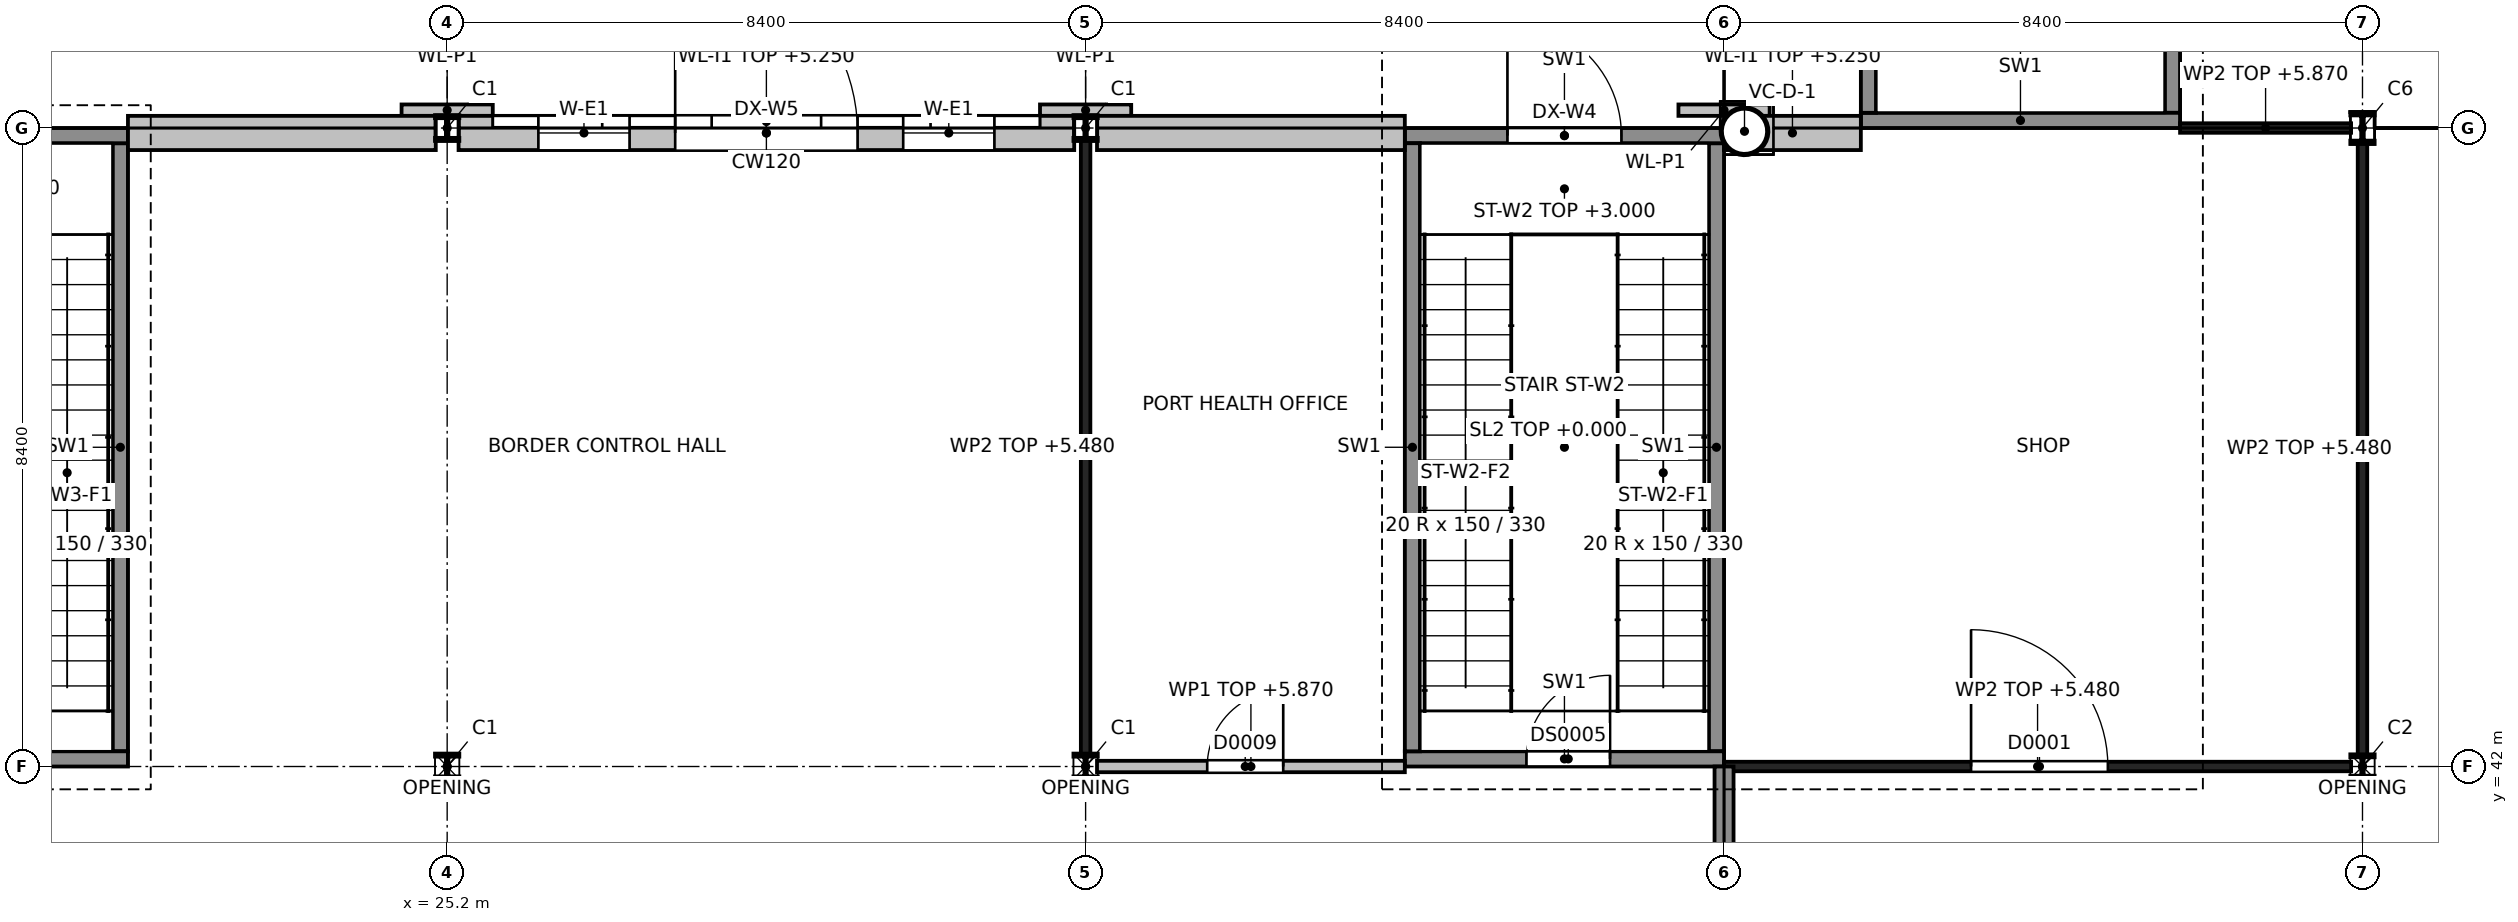
"""IFC4 building model, lengths in metres.
Left out: names, types, materials, properties, quantities, classifications, styles, units other than length and angle.
Written with IfcOpenShell. Run it as: python <this file> out.ifc"""

import sys

from ifc_helpers import new_model, si_unit, direction, frame, frame_2d, origin, origin_2d, place, context, subcontext, project, spatial, rectangle, hollow_circle, i_section, extrude, element, fill, save


model = new_model("IFC4")
c1 = context("Model", 3, precision=1e-05, world=origin(), true_north=direction((0.0, 1.0)))
c2 = subcontext(c1, "Body", "Model", "MODEL_VIEW")
j1 = project(units=[si_unit("LENGTHUNIT", "METRE"), si_unit("PLANEANGLEUNIT", "RADIAN")], contexts=[c1])
p1 = place(None, origin())
s1 = spatial("IfcSite", under=j1, at=p1, CompositionType="ELEMENT")
p2 = place(p1, origin())
s2 = spatial("IfcBuilding", under=s1, at=p2, CompositionType="ELEMENT")
p3 = place(p2, origin())
s3 = spatial("IfcBuildingStorey", under=s2, at=p3, CompositionType="ELEMENT", Elevation=0.0)
p4 = place(p3, frame((42.3, 50.4, -1.35), z_axis=(-0.012121219783, -0.01683687241, 0.999784774718), x_axis=(0.811564701734, -0.584262556475, 0.0)))
e1 = element("IfcColumn", 1, at=p4, inside=s3, PredefinedType="COLUMN", context=c2, shape_type="SweptSolid", body=[
    extrude(hollow_circle(Radius=0.305, WallThickness=0.02, at=origin_2d()), origin(), (0.0, 0.0, 1.0), 7.352),
])
for number, where, z_axis, x_axis in (
    (2, (25.2, 42.0, -1.35), (0.0, 0.0, 1.0), (1.0, 0.0, 0.0)),
    (3, (25.2, 50.4, -1.35), (0.0, 0.0, 1.0), (1.0, 0.0, 0.0)),
    (4, (33.6, 42.0, -1.35), (0.0, 0.0, 1.0), (1.0, 0.0, 0.0)),
    (5, (33.6, 50.4, -1.35), (0.0, 0.0, 1.0), (1.0, 0.0, 0.0)),
):
    element("IfcColumn", number, at=place(p3, frame(where, z_axis=z_axis, x_axis=x_axis)), inside=s3, PredefinedType="COLUMN", context=c2, shape_type="SweptSolid", body=[
        extrude(i_section(OverallWidth=0.3, OverallDepth=0.32, WebThickness=0.011, FlangeThickness=0.021, at=origin_2d()), origin(), (0.0, 0.0, 1.0), 7.35),
    ])
p5 = place(p3, frame((50.4, 42.0, -1.35), z_axis=(0.0, 0.0, 1.0), x_axis=(1.0, 0.0, 0.0)))
e6 = element("IfcColumn", 6, at=p5, inside=s3, PredefinedType="COLUMN", context=c2, shape_type="SweptSolid", body=[
    extrude(i_section(OverallWidth=0.3, OverallDepth=0.3, WebThickness=0.011, FlangeThickness=0.019, at=origin_2d()), origin(), (0.0, 0.0, 1.0), 7.35),
])
p6 = place(p3, frame((50.4, 50.4, -1.35), z_axis=(0.0, 0.0, 1.0), x_axis=(1.0, 0.0, 0.0)))
e7 = element("IfcColumn", 7, at=p6, inside=s3, PredefinedType="COLUMN", context=c2, shape_type="SweptSolid", body=[
    extrude(i_section(OverallWidth=0.3, OverallDepth=0.4, WebThickness=0.013, FlangeThickness=0.024, at=origin_2d()), origin(), (0.0, 0.0, 1.0), 7.35),
])
p7 = place(p3, frame((43.8, 50.5, -1.35), z_axis=(0.0, 0.0, 1.0), x_axis=(1.0, 0.0, 0.0)))
e8 = element("IfcWall", 8, at=p7, inside=s3, PredefinedType="SHEAR", context=c2, shape_type="SweptSolid", body=[
    extrude(rectangle(XDim=4.2, YDim=0.2, at=frame_2d((2.1, 0.0))), origin(), (0.0, 0.0, 1.0), 7.35),
])
p8 = place(p3, frame((43.9, 50.6, -1.35), z_axis=(0.0, 0.0, 1.0), x_axis=(0.0, 1.0, 0.0)))
e9 = element("IfcWall", 9, at=p8, inside=s3, PredefinedType="SHEAR", context=c2, shape_type="SweptSolid", body=[
    extrude(rectangle(XDim=8.0, YDim=0.2, at=frame_2d((4.0, 0.0))), origin(), (0.0, 0.0, 1.0), 7.35),
])
p9 = place(p8, frame((3.25, 0.0, 1.35)))
e10 = element("IfcOpeningElement", 10, at=p9, cuts=e9, PredefinedType="OPENING", context=c2, shape_type="SweptSolid", body=[
    extrude(rectangle(XDim=1.5, YDim=2.4, at=frame_2d((0.75, 1.2))), frame((0.0, 0.1, 0.0), z_axis=(0.0, -1.0, 0.0), x_axis=(1.0, 0.0, 0.0)), (0.0, 0.0, 1.0), 0.2),
])
p10 = place(p3, frame((47.9, 50.6, -1.35), z_axis=(0.0, 0.0, 1.0), x_axis=(0.0, 1.0, 0.0)))
e11 = element("IfcWall", 11, at=p10, inside=s3, PredefinedType="SHEAR", context=c2, shape_type="SweptSolid", body=[
    extrude(rectangle(XDim=8.0, YDim=0.2, at=frame_2d((4.0, 0.0))), origin(), (0.0, 0.0, 1.0), 7.35),
])
p11 = place(p10, frame((3.5, 0.0, 1.35)))
e12 = element("IfcOpeningElement", 12, at=p11, cuts=e11, PredefinedType="OPENING", context=c2, shape_type="SweptSolid", body=[
    extrude(rectangle(XDim=1.1, YDim=2.1, at=frame_2d((0.55, 1.05))), frame((0.0, 0.1, 0.0), z_axis=(0.0, -1.0, 0.0), x_axis=(1.0, 0.0, 0.0)), (0.0, 0.0, 1.0), 0.2),
])
p12 = place(p3, frame((37.8, 42.1, -1.35), z_axis=(0.0, 0.0, 1.0), x_axis=(1.0, 0.0, 0.0)))
e13 = element("IfcWall", 13, at=p12, inside=s3, PredefinedType="SHEAR", context=c2, shape_type="SweptSolid", body=[
    extrude(rectangle(XDim=4.2, YDim=0.2, at=frame_2d((2.1, 0.0))), origin(), (0.0, 0.0, 1.0), 7.35),
])
p13 = place(p12, frame((1.6, 0.0, 1.35)))
e14 = element("IfcOpeningElement", 14, at=p13, cuts=e13, PredefinedType="OPENING", context=c2, shape_type="SweptSolid", body=[
    extrude(rectangle(XDim=1.1, YDim=2.1, at=frame_2d((0.55, 1.05))), frame((0.0, 0.1, 0.0), z_axis=(0.0, -1.0, 0.0), x_axis=(1.0, 0.0, 0.0)), (0.0, 0.0, 1.0), 0.2),
])
p14 = place(p3, frame((37.8, 50.3, -1.35), z_axis=(0.0, 0.0, 1.0), x_axis=(1.0, 0.0, 0.0)))
e15 = element("IfcWall", 15, at=p14, inside=s3, PredefinedType="SHEAR", context=c2, shape_type="SweptSolid", body=[
    extrude(rectangle(XDim=4.2, YDim=0.2, at=frame_2d((2.1, 0.0))), origin(), (0.0, 0.0, 1.0), 7.35),
])
p15 = place(p14, frame((1.35, 0.0, 1.35)))
e16 = element("IfcOpeningElement", 16, at=p15, cuts=e15, PredefinedType="OPENING", context=c2, shape_type="SweptSolid", body=[
    extrude(rectangle(XDim=1.5, YDim=2.4, at=frame_2d((0.75, 1.2))), frame((0.0, 0.1, 0.0), z_axis=(0.0, -1.0, 0.0), x_axis=(1.0, 0.0, 0.0)), (0.0, 0.0, 1.0), 0.2),
])
for number, where, z_axis, x_axis in (
    (17, (37.9, 42.2, -1.35), (0.0, 0.0, 1.0), (0.0, 1.0, 0.0)),
    (18, (41.9, 42.2, -1.35), (0.0, 0.0, 1.0), (0.0, 1.0, 0.0)),
):
    element("IfcWall", number, at=place(p3, frame(where, z_axis=z_axis, x_axis=x_axis)), inside=s3, PredefinedType="SHEAR", context=c2, shape_type="SweptSolid", body=[
        extrude(rectangle(XDim=8.0, YDim=0.2, at=frame_2d((4.0, 0.0))), origin(), (0.0, 0.0, 1.0), 7.35),
    ])
p16 = place(p3, frame((16.8, 42.1, -1.35), z_axis=(0.0, 0.0, 1.0), x_axis=(1.0, 0.0, 0.0)))
e19 = element("IfcWall", 19, at=p16, inside=s3, PredefinedType="SHEAR", context=c2, shape_type="SweptSolid", body=[
    extrude(rectangle(XDim=4.2, YDim=0.2, at=frame_2d((2.1, 0.0))), origin(), (0.0, 0.0, 1.0), 7.35),
])
p17 = place(p16, frame((1.6, 0.0, 1.35)))
e20 = element("IfcOpeningElement", 20, at=p17, cuts=e19, PredefinedType="OPENING", context=c2, shape_type="SweptSolid", body=[
    extrude(rectangle(XDim=1.1, YDim=2.1, at=frame_2d((0.55, 1.05))), frame((0.0, 0.1, 0.0), z_axis=(0.0, -1.0, 0.0), x_axis=(1.0, 0.0, 0.0)), (0.0, 0.0, 1.0), 0.2),
])
p18 = place(p3, frame((16.8, 50.3, -1.35), z_axis=(0.0, 0.0, 1.0), x_axis=(1.0, 0.0, 0.0)))
e21 = element("IfcWall", 21, at=p18, inside=s3, PredefinedType="SHEAR", context=c2, shape_type="SweptSolid", body=[
    extrude(rectangle(XDim=4.2, YDim=0.2, at=frame_2d((2.1, 0.0))), origin(), (0.0, 0.0, 1.0), 7.35),
])
p19 = place(p18, frame((1.35, 0.0, 1.35)))
e22 = element("IfcOpeningElement", 22, at=p19, cuts=e21, PredefinedType="OPENING", context=c2, shape_type="SweptSolid", body=[
    extrude(rectangle(XDim=1.5, YDim=2.4, at=frame_2d((0.75, 1.2))), frame((0.0, 0.1, 0.0), z_axis=(0.0, -1.0, 0.0), x_axis=(1.0, 0.0, 0.0)), (0.0, 0.0, 1.0), 0.2),
])
p20 = place(p3, frame((20.9, 42.2, -1.35), z_axis=(0.0, 0.0, 1.0), x_axis=(0.0, 1.0, 0.0)))
e23 = element("IfcWall", 23, at=p20, inside=s3, PredefinedType="SHEAR", context=c2, shape_type="SweptSolid", body=[
    extrude(rectangle(XDim=8.0, YDim=0.2, at=frame_2d((4.0, 0.0))), origin(), (0.0, 0.0, 1.0), 7.35),
])
p21 = place(p3, frame((21.0, 50.335, 0.0), z_axis=(0.0, 0.0, 1.0), x_axis=(1.0, 0.0, 0.0)))
e24 = element("IfcWall", 24, at=p21, inside=s3, PredefinedType="SOLIDWALL", context=c2, shape_type="SweptSolid", body=[
    extrude(rectangle(XDim=4.05, YDim=0.45, at=frame_2d((2.025, 0.0))), origin(), (0.0, 0.0, 1.0), 5.25),
])
p22 = place(p3, frame((25.35, 50.335, 0.0), z_axis=(0.0, 0.0, 1.0), x_axis=(1.0, 0.0, 0.0)))
e25 = element("IfcWall", 25, at=p22, inside=s3, PredefinedType="SOLIDWALL", context=c2, shape_type="SweptSolid", body=[
    extrude(rectangle(XDim=8.1, YDim=0.45, at=frame_2d((4.05, 0.0))), origin(), (0.0, 0.0, 1.0), 5.25),
])
p23 = place(p22, frame((2.85, 0.0, 0.0)))
e26 = element("IfcOpeningElement", 26, at=p23, cuts=e25, PredefinedType="OPENING", context=c2, shape_type="SweptSolid", body=[
    extrude(rectangle(XDim=2.4, YDim=2.4, at=frame_2d((1.2, 1.2))), frame((0.0, 0.225, 0.0), z_axis=(0.0, -1.0, 0.0), x_axis=(1.0, 0.0, 0.0)), (0.0, 0.0, 1.0), 0.45),
])
p24 = place(p22, frame((1.05, 0.0, 0.9)))
e27 = element("IfcOpeningElement", 27, at=p24, cuts=e25, PredefinedType="OPENING", context=c2, shape_type="SweptSolid", body=[
    extrude(rectangle(XDim=1.2, YDim=3.0, at=frame_2d((0.6, 1.5))), frame((0.0, 0.225, 0.0), z_axis=(0.0, -1.0, 0.0), x_axis=(1.0, 0.0, 0.0)), (0.0, 0.0, 1.0), 0.45),
])
p25 = place(p22, frame((5.85, 0.0, 0.9)))
e28 = element("IfcOpeningElement", 28, at=p25, cuts=e25, PredefinedType="OPENING", context=c2, shape_type="SweptSolid", body=[
    extrude(rectangle(XDim=1.2, YDim=3.0, at=frame_2d((0.6, 1.5))), frame((0.0, 0.225, 0.0), z_axis=(0.0, -1.0, 0.0), x_axis=(1.0, 0.0, 0.0)), (0.0, 0.0, 1.0), 0.45),
])
p26 = place(p3, frame((33.75, 50.335, 0.0), z_axis=(0.0, 0.0, 1.0), x_axis=(1.0, 0.0, 0.0)))
e29 = element("IfcWall", 29, at=p26, inside=s3, PredefinedType="SOLIDWALL", context=c2, shape_type="SweptSolid", body=[
    extrude(rectangle(XDim=4.05, YDim=0.45, at=frame_2d((2.025, 0.0))), origin(), (0.0, 0.0, 1.0), 5.25),
])
p27 = place(p3, frame((42.0, 50.335, 0.0), z_axis=(0.0, 0.0, 1.0), x_axis=(1.0, 0.0, 0.0)))
e30 = element("IfcWall", 30, at=p27, inside=s3, PredefinedType="SOLIDWALL", context=c2, shape_type="SweptSolid", body=[
    extrude(rectangle(XDim=1.8, YDim=0.45, at=frame_2d((0.9, 0.0))), origin(), (0.0, 0.0, 1.0), 5.25),
])
for number, where, z_axis, x_axis in (
    (31, (24.6, 50.635, 0.0), (0.0, 0.0, 1.0), (1.0, 0.0, 0.0)),
    (32, (33.0, 50.635, 0.0), (0.0, 0.0, 1.0), (1.0, 0.0, 0.0)),
):
    element("IfcWall", number, at=place(p3, frame(where, z_axis=z_axis, x_axis=x_axis)), inside=s3, PredefinedType="SOLIDWALL", context=c2, shape_type="SweptSolid", body=[
        extrude(rectangle(XDim=1.2, YDim=0.15, at=frame_2d((0.6, 0.0))), origin(), (0.0, 0.0, 1.0), 6.0),
    ])
p28 = place(p3, frame((41.4, 50.635, 0.0), z_axis=(0.0, 0.0, 1.0), x_axis=(1.0, 0.0, 0.0)))
e33 = element("IfcWall", 33, at=p28, inside=s3, PredefinedType="SOLIDWALL", context=c2, shape_type="SweptSolid", body=[
    extrude(rectangle(XDim=1.2, YDim=0.15, at=frame_2d((0.6, 0.0))), origin(), (0.0, 0.0, 1.0), 6.0),
])
p29 = place(p3, frame((42.0, 42.0, 0.0), z_axis=(0.0, 0.0, 1.0), x_axis=(1.0, 0.0, 0.0)))
e34 = element("IfcWall", 34, at=p29, inside=s3, PredefinedType="PARTITIONING", context=c2, shape_type="SweptSolid", body=[
    extrude(rectangle(XDim=8.25, YDim=0.125, at=frame_2d((4.125, 0.0))), origin(), (0.0, 0.0, 1.0), 5.48),
])
p30 = place(p29, frame((3.25, 0.0, 0.0)))
e35 = element("IfcOpeningElement", 35, at=p30, cuts=e34, PredefinedType="OPENING", context=c2, shape_type="SweptSolid", body=[
    extrude(rectangle(XDim=1.8, YDim=2.1, at=frame_2d((0.9, 1.05))), frame((0.0, 0.062, 0.0), z_axis=(0.0, -1.0, 0.0), x_axis=(1.0, 0.0, 0.0)), (0.0, 0.0, 1.0), 0.125),
])
p31 = place(p3, frame((42.0, 33.6, 0.0), z_axis=(0.0, 0.0, 1.0), x_axis=(0.0, 1.0, 0.0)))
e36 = element("IfcWall", 36, at=p31, inside=s3, PredefinedType="PARTITIONING", context=c2, shape_type="SweptSolid", body=[
    extrude(rectangle(XDim=8.4, YDim=0.25, at=frame_2d((4.2, 0.0))), origin(), (0.0, 0.0, 1.0), 5.48),
])
p32 = place(p31, frame((2.95, 0.0, 0.0)))
e37 = element("IfcOpeningElement", 37, at=p32, cuts=e36, PredefinedType="OPENING", context=c2, shape_type="SweptSolid", body=[
    extrude(rectangle(XDim=2.4, YDim=2.4, at=frame_2d((1.2, 1.2))), frame((0.0, 0.125, 0.0), z_axis=(0.0, -1.0, 0.0), x_axis=(1.0, 0.0, 0.0)), (0.0, 0.0, 1.0), 0.25),
])
p33 = place(p3, frame((50.4, 42.15, 0.0), z_axis=(0.0, 0.0, 1.0), x_axis=(0.0, 1.0, 0.0)))
e38 = element("IfcWall", 38, at=p33, inside=s3, PredefinedType="PARTITIONING", context=c2, shape_type="SweptSolid", body=[
    extrude(rectangle(XDim=8.05, YDim=0.125, at=frame_2d((4.025, 0.0))), origin(), (0.0, 0.0, 1.0), 5.48),
])
p34 = place(p3, frame((48.0, 50.4, 0.0), z_axis=(0.0, 0.0, 1.0), x_axis=(1.0, 0.0, 0.0)))
e39 = element("IfcWall", 39, at=p34, inside=s3, PredefinedType="PARTITIONING", context=c2, shape_type="SweptSolid", body=[
    extrude(rectangle(XDim=2.25, YDim=0.125, at=frame_2d((1.125, 0.0))), origin(), (0.0, 0.0, 1.0), 5.87),
])
p35 = place(p3, frame((33.75, 42.0, 0.0), z_axis=(0.0, 0.0, 1.0), x_axis=(1.0, 0.0, 0.0)))
e40 = element("IfcWall", 40, at=p35, inside=s3, PredefinedType="PARTITIONING", context=c2, shape_type="SweptSolid", body=[
    extrude(rectangle(XDim=4.05, YDim=0.15, at=frame_2d((2.025, 0.0))), origin(), (0.0, 0.0, 1.0), 5.87),
])
p36 = place(p35, frame((1.45, 0.0, 0.0)))
e41 = element("IfcOpeningElement", 41, at=p36, cuts=e40, PredefinedType="OPENING", context=c2, shape_type="SweptSolid", body=[
    extrude(rectangle(XDim=1.0, YDim=2.2, at=frame_2d((0.5, 1.1))), frame((0.0, 0.075, 0.0), z_axis=(0.0, -1.0, 0.0), x_axis=(1.0, 0.0, 0.0)), (0.0, 0.0, 1.0), 0.15),
])
p37 = place(p3, frame((33.6, 42.16, 0.0), z_axis=(0.0, 0.0, 1.0), x_axis=(0.0, 1.0, 0.0)))
e42 = element("IfcWall", 42, at=p37, inside=s3, PredefinedType="PARTITIONING", context=c2, shape_type="SweptSolid", body=[
    extrude(rectangle(XDim=8.08, YDim=0.125, at=frame_2d((4.04, 0.0))), origin(), (0.0, 0.0, 1.0), 5.48),
])
p38 = place(p23, origin())
e43 = element("IfcDoor", 43, at=p38, inside=s3, OperationType="DOUBLE_DOOR_SINGLE_SWING", PredefinedType="DOOR", context=c2, shape_type="SweptSolid", body=[
    extrude(rectangle(XDim=2.4, YDim=2.4, at=frame_2d((1.2, 1.2))), frame((0.0, 0.025, 0.0), z_axis=(0.0, -1.0, 0.0), x_axis=(1.0, 0.0, 0.0)), (0.0, 0.0, 1.0), 0.05),
])
fill(e26, e43)
p39 = place(p24, origin())
e44 = element("IfcWindow", 44, at=p39, inside=s3, PartitioningType="SINGLE_PANEL", PredefinedType="WINDOW", context=c2, shape_type="SweptSolid", body=[
    extrude(rectangle(XDim=1.2, YDim=3.0, at=frame_2d((0.6, 1.5))), frame((0.0, 0.03, 0.0), z_axis=(0.0, -1.0, 0.0), x_axis=(1.0, 0.0, 0.0)), (0.0, 0.0, 1.0), 0.06),
])
fill(e27, e44)
p40 = place(p25, origin())
e45 = element("IfcWindow", 45, at=p40, inside=s3, PartitioningType="SINGLE_PANEL", PredefinedType="WINDOW", context=c2, shape_type="SweptSolid", body=[
    extrude(rectangle(XDim=1.2, YDim=3.0, at=frame_2d((0.6, 1.5))), frame((0.0, 0.03, 0.0), z_axis=(0.0, -1.0, 0.0), x_axis=(1.0, 0.0, 0.0)), (0.0, 0.0, 1.0), 0.06),
])
fill(e28, e45)
p41 = place(p15, origin())
e46 = element("IfcDoor", 46, at=p41, inside=s3, OperationType="DOUBLE_DOOR_SINGLE_SWING", PredefinedType="DOOR", context=c2, shape_type="SweptSolid", body=[
    extrude(rectangle(XDim=1.5, YDim=2.4, at=frame_2d((0.75, 1.2))), frame((0.0, 0.025, 0.0), z_axis=(0.0, -1.0, 0.0), x_axis=(1.0, 0.0, 0.0)), (0.0, 0.0, 1.0), 0.05),
])
fill(e16, e46)
p42 = place(p30, origin())
e47 = element("IfcDoor", 47, at=p42, inside=s3, OperationType="DOUBLE_DOOR_DOUBLE_SWING", PredefinedType="DOOR", context=c2, shape_type="SweptSolid", body=[
    extrude(rectangle(XDim=1.8, YDim=2.1, at=frame_2d((0.9, 1.05))), frame((0.0, 0.025, 0.0), z_axis=(0.0, -1.0, 0.0), x_axis=(1.0, 0.0, 0.0)), (0.0, 0.0, 1.0), 0.05),
])
fill(e35, e47)
p43 = place(p36, origin())
e48 = element("IfcDoor", 48, at=p43, inside=s3, OperationType="SINGLE_SWING_RIGHT", PredefinedType="DOOR", context=c2, shape_type="SweptSolid", body=[
    extrude(rectangle(XDim=1.0, YDim=2.2, at=frame_2d((0.5, 1.1))), frame((0.0, 0.025, 0.0), z_axis=(0.0, -1.0, 0.0), x_axis=(1.0, 0.0, 0.0)), (0.0, 0.0, 1.0), 0.05),
])
fill(e41, e48)
p44 = place(p13, frame((1.1, 0.05, 0.0), z_axis=(0.0, 0.0, 1.0), x_axis=(-1.0, 0.0, 0.0)))
e49 = element("IfcDoor", 49, at=p44, inside=s3, OperationType="SINGLE_SWING_RIGHT", PredefinedType="DOOR", context=c2, shape_type="SweptSolid", body=[
    extrude(rectangle(XDim=1.1, YDim=2.1, at=frame_2d((0.55, 1.05))), frame((0.0, 0.025, 0.0), z_axis=(0.0, -1.0, 0.0), x_axis=(1.0, 0.0, 0.0)), (0.0, 0.0, 1.0), 0.05),
])
fill(e14, e49)
save(model, sys.argv[1])
